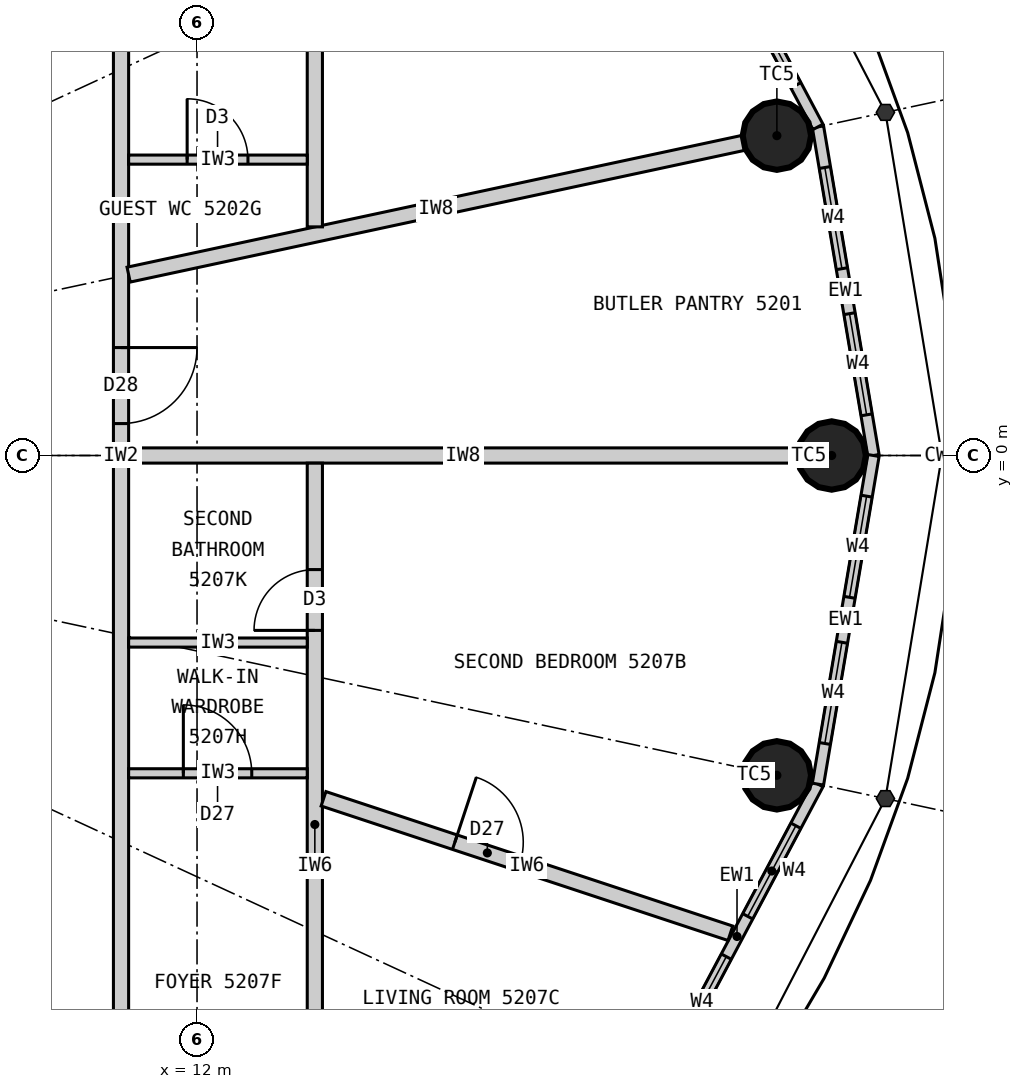
"""IFC4 building model, lengths in metres.
Left out: names, types, materials, properties, quantities, classifications, styles, units other than length and angle.
Written with IfcOpenShell. Run it as: python <this file> out.ifc"""

import sys

from ifc_helpers import new_model, si_unit, direction, frame, frame_2d, origin, origin_2d, place, context, subcontext, project, spatial, rectangle, circle, extrude, element, fill, save


model = new_model("IFC4")
c1 = context("Model", 3, precision=1e-05, world=origin(), true_north=direction((0.0, 1.0)))
c2 = subcontext(c1, "Body", "Model", "MODEL_VIEW")
j1 = project(units=[si_unit("LENGTHUNIT", "METRE"), si_unit("PLANEANGLEUNIT", "RADIAN")], contexts=[c1])
p1 = place(None, origin())
s1 = spatial("IfcSite", under=j1, at=p1, CompositionType="ELEMENT")
p2 = place(p1, origin())
s2 = spatial("IfcBuilding", under=s1, at=p2, CompositionType="ELEMENT")
p3 = place(p2, frame((0.0, 0.0, 196.2)))
s3 = spatial("IfcBuildingStorey", under=s2, at=p3, CompositionType="ELEMENT", Elevation=196.2)
for number, where, z_axis, x_axis in (
    (1, (20.35, 0.0, 0.0), (0.0, 0.0, 1.0), (1.0, 0.0, 0.0)),
    (2, (19.629, 4.208, 0.0), (0.0, 0.0, 1.0), (1.0, 0.0, 0.0)),
    (3, (19.629, -4.208, 0.0), (0.0, 0.0, 1.0), (1.0, 0.0, 0.0)),
):
    element("IfcColumn", number, at=place(p3, frame(where, z_axis=z_axis, x_axis=x_axis)), inside=s3, PredefinedType="COLUMN", context=c2, shape_type="SweptSolid", body=[
        extrude(circle(Radius=0.45, at=origin_2d()), origin(), (0.0, 0.0, 1.0), 3.3),
    ])
p4 = place(p3, frame((20.9, 0.0, 0.0), z_axis=(0.0, 0.0, 1.0), x_axis=(-0.166538513568, 0.986034950445, 0.0)))
e4 = element("IfcWall", 4, at=p4, inside=s3, PredefinedType="ELEMENTEDWALL", context=c2, shape_type="SweptSolid", body=[
    extrude(rectangle(XDim=4.385, YDim=0.15, at=frame_2d((2.192, 0.0))), origin(), (0.0, 0.0, 1.0), 3.12),
])
p5 = place(p4, frame((0.542, 0.0, 0.9)))
e5 = element("IfcOpeningElement", 5, at=p5, cuts=e4, PredefinedType="OPENING", context=c2, shape_type="SweptSolid", body=[
    extrude(rectangle(XDim=1.35, YDim=1.9, at=frame_2d((0.675, 0.95))), frame((0.0, 0.085, 0.0), z_axis=(0.0, -1.0, 0.0), x_axis=(1.0, 0.0, 0.0)), (0.0, 0.0, 1.0), 0.17),
])
p6 = place(p4, frame((2.492, 0.0, 0.9)))
e6 = element("IfcOpeningElement", 6, at=p6, cuts=e4, PredefinedType="OPENING", context=c2, shape_type="SweptSolid", body=[
    extrude(rectangle(XDim=1.35, YDim=1.9, at=frame_2d((0.675, 0.95))), frame((0.0, 0.085, 0.0), z_axis=(0.0, -1.0, 0.0), x_axis=(1.0, 0.0, 0.0)), (0.0, 0.0, 1.0), 0.17),
])
p7 = place(p3, frame((20.17, 4.323, 0.0), z_axis=(0.0, 0.0, 1.0), x_axis=(-0.469256152955, 0.883062094597, 0.0)))
e7 = element("IfcWall", 7, at=p7, inside=s3, PredefinedType="ELEMENTEDWALL", context=c2, shape_type="SweptSolid", body=[
    extrude(rectangle(XDim=4.539, YDim=0.15, at=frame_2d((2.27, 0.0))), origin(), (0.0, 0.0, 1.0), 3.12),
])
p8 = place(p7, frame((0.62, 0.0, 0.9)))
e8 = element("IfcOpeningElement", 8, at=p8, cuts=e7, PredefinedType="OPENING", context=c2, shape_type="SweptSolid", body=[
    extrude(rectangle(XDim=1.35, YDim=1.9, at=frame_2d((0.675, 0.95))), frame((0.0, 0.085, 0.0), z_axis=(0.0, -1.0, 0.0), x_axis=(1.0, 0.0, 0.0)), (0.0, 0.0, 1.0), 0.17),
])
p9 = place(p7, frame((2.57, 0.0, 0.9)))
e9 = element("IfcOpeningElement", 9, at=p9, cuts=e7, PredefinedType="OPENING", context=c2, shape_type="SweptSolid", body=[
    extrude(rectangle(XDim=1.35, YDim=1.9, at=frame_2d((0.675, 0.95))), frame((0.0, 0.085, 0.0), z_axis=(0.0, -1.0, 0.0), x_axis=(1.0, 0.0, 0.0)), (0.0, 0.0, 1.0), 0.17),
])
p10 = place(p3, frame((18.04, -8.332, 0.0), z_axis=(0.0, 0.0, 1.0), x_axis=(0.469256152955, 0.883062094597, 0.0)))
e10 = element("IfcWall", 10, at=p10, inside=s3, PredefinedType="ELEMENTEDWALL", context=c2, shape_type="SweptSolid", body=[
    extrude(rectangle(XDim=4.539, YDim=0.15, at=frame_2d((2.27, 0.0))), origin(), (0.0, 0.0, 1.0), 3.12),
])
p11 = place(p10, frame((0.62, 0.0, 0.9)))
e11 = element("IfcOpeningElement", 11, at=p11, cuts=e10, PredefinedType="OPENING", context=c2, shape_type="SweptSolid", body=[
    extrude(rectangle(XDim=1.35, YDim=1.9, at=frame_2d((0.675, 0.95))), frame((0.0, 0.085, 0.0), z_axis=(0.0, -1.0, 0.0), x_axis=(1.0, 0.0, 0.0)), (0.0, 0.0, 1.0), 0.17),
])
p12 = place(p10, frame((2.57, 0.0, 0.9)))
e12 = element("IfcOpeningElement", 12, at=p12, cuts=e10, PredefinedType="OPENING", context=c2, shape_type="SweptSolid", body=[
    extrude(rectangle(XDim=1.35, YDim=1.9, at=frame_2d((0.675, 0.95))), frame((0.0, 0.085, 0.0), z_axis=(0.0, -1.0, 0.0), x_axis=(1.0, 0.0, 0.0)), (0.0, 0.0, 1.0), 0.17),
])
p13 = place(p3, frame((20.17, -4.323, 0.0), z_axis=(0.0, 0.0, 1.0), x_axis=(0.166538513568, 0.986034950445, 0.0)))
e13 = element("IfcWall", 13, at=p13, inside=s3, PredefinedType="ELEMENTEDWALL", context=c2, shape_type="SweptSolid", body=[
    extrude(rectangle(XDim=4.385, YDim=0.15, at=frame_2d((2.192, 0.0))), origin(), (0.0, 0.0, 1.0), 3.12),
])
p14 = place(p13, frame((0.542, 0.0, 0.9)))
e14 = element("IfcOpeningElement", 14, at=p14, cuts=e13, PredefinedType="OPENING", context=c2, shape_type="SweptSolid", body=[
    extrude(rectangle(XDim=1.35, YDim=1.9, at=frame_2d((0.675, 0.95))), frame((0.0, 0.085, 0.0), z_axis=(0.0, -1.0, 0.0), x_axis=(1.0, 0.0, 0.0)), (0.0, 0.0, 1.0), 0.17),
])
p15 = place(p13, frame((2.492, 0.0, 0.9)))
e15 = element("IfcOpeningElement", 15, at=p15, cuts=e13, PredefinedType="OPENING", context=c2, shape_type="SweptSolid", body=[
    extrude(rectangle(XDim=1.35, YDim=1.9, at=frame_2d((0.675, 0.95))), frame((0.0, 0.085, 0.0), z_axis=(0.0, -1.0, 0.0), x_axis=(1.0, 0.0, 0.0)), (0.0, 0.0, 1.0), 0.17),
])
p16 = place(p3, frame((11.0, -9.9, 0.0), z_axis=(0.0, 0.0, 1.0), x_axis=(0.0, 1.0, 0.0)))
e16 = element("IfcWall", 16, at=p16, inside=s3, PredefinedType="PARTITIONING", context=c2, shape_type="SweptSolid", body=[
    extrude(rectangle(XDim=19.8, YDim=0.2, at=frame_2d((9.9, 0.0))), origin(), (0.0, 0.0, 1.0), 3.12),
])
p17 = place(p16, frame((10.32, 0.0, 0.0)))
e17 = element("IfcOpeningElement", 17, at=p17, cuts=e16, PredefinedType="OPENING", context=c2, shape_type="SweptSolid", body=[
    extrude(rectangle(XDim=1.0, YDim=2.2, at=frame_2d((0.5, 1.1))), frame((0.0, 0.11, 0.0), z_axis=(0.0, -1.0, 0.0), x_axis=(1.0, 0.0, 0.0)), (0.0, 0.0, 1.0), 0.22),
])
p18 = place(p16, frame((18.653, 0.0, 0.0)))
e18 = element("IfcOpeningElement", 18, at=p18, cuts=e16, PredefinedType="OPENING", context=c2, shape_type="SweptSolid", body=[
    extrude(rectangle(XDim=1.0, YDim=2.2, at=frame_2d((0.5, 1.1))), frame((0.0, 0.11, 0.0), z_axis=(0.0, -1.0, 0.0), x_axis=(1.0, 0.0, 0.0)), (0.0, 0.0, 1.0), 0.22),
])
p19 = place(p16, frame((0.379, 0.0, 0.0)))
e19 = element("IfcOpeningElement", 19, at=p19, cuts=e16, PredefinedType="OPENING", context=c2, shape_type="SweptSolid", body=[
    extrude(rectangle(XDim=1.0, YDim=2.2, at=frame_2d((0.5, 1.1))), frame((0.0, 0.11, 0.0), z_axis=(0.0, -1.0, 0.0), x_axis=(1.0, 0.0, 0.0)), (0.0, 0.0, 1.0), 0.22),
])
p20 = place(p3, frame((11.1, 0.0, 0.0), z_axis=(0.0, 0.0, 1.0), x_axis=(1.0, 0.0, 0.0)))
e20 = element("IfcWall", 20, at=p20, inside=s3, PredefinedType="PARTITIONING", context=c2, shape_type="SweptSolid", body=[
    extrude(rectangle(XDim=8.8, YDim=0.2, at=frame_2d((4.4, 0.0))), origin(), (0.0, 0.0, 1.0), 2.37),
])
p21 = place(p3, frame((11.1, 2.379, 0.0), z_axis=(0.0, 0.0, 1.0), x_axis=(0.977789888126, 0.209587534647, 0.0)))
e21 = element("IfcWall", 21, at=p21, inside=s3, PredefinedType="PARTITIONING", context=c2, shape_type="SweptSolid", body=[
    extrude(rectangle(XDim=8.273, YDim=0.2, at=frame_2d((4.136, 0.0))), origin(), (0.0, 0.0, 1.0), 2.42),
])
p22 = place(p3, frame((13.55, 3.008, 0.0), z_axis=(0.0, 0.0, 1.0), x_axis=(0.0, 1.0, 0.0)))
e22 = element("IfcWall", 22, at=p22, inside=s3, PredefinedType="PARTITIONING", context=c2, shape_type="SweptSolid", body=[
    extrude(rectangle(XDim=6.601, YDim=0.2, at=frame_2d((3.3, 0.0))), origin(), (0.0, 0.0, 1.0), 3.12),
])
p23 = place(p22, frame((2.87, 0.0, 0.0)))
e23 = element("IfcOpeningElement", 23, at=p23, cuts=e22, PredefinedType="OPENING", context=c2, shape_type="SweptSolid", body=[
    extrude(rectangle(XDim=0.9, YDim=2.1, at=frame_2d((0.45, 1.05))), frame((0.0, 0.11, 0.0), z_axis=(0.0, -1.0, 0.0), x_axis=(1.0, 0.0, 0.0)), (0.0, 0.0, 1.0), 0.22),
])
p24 = place(p3, frame((11.1, 3.893, 0.0), z_axis=(0.0, 0.0, 1.0), x_axis=(1.0, 0.0, 0.0)))
e24 = element("IfcWall", 24, at=p24, inside=s3, PredefinedType="PARTITIONING", context=c2, shape_type="SweptSolid", body=[
    extrude(rectangle(XDim=2.35, YDim=0.12, at=frame_2d((1.175, 0.0))), origin(), (0.0, 0.0, 1.0), 3.12),
])
p25 = place(p24, frame((0.77, 0.0, 0.0)))
e25 = element("IfcOpeningElement", 25, at=p25, cuts=e24, PredefinedType="OPENING", context=c2, shape_type="SweptSolid", body=[
    extrude(rectangle(XDim=0.8, YDim=2.1, at=frame_2d((0.4, 1.05))), frame((0.0, 0.07, 0.0), z_axis=(0.0, -1.0, 0.0), x_axis=(1.0, 0.0, 0.0)), (0.0, 0.0, 1.0), 0.14),
])
p26 = place(p3, frame((13.55, -9.609, 0.0), z_axis=(0.0, 0.0, 1.0), x_axis=(0.0, 1.0, 0.0)))
e26 = element("IfcWall", 26, at=p26, inside=s3, PredefinedType="PARTITIONING", context=c2, shape_type="SweptSolid", body=[
    extrude(rectangle(XDim=9.508, YDim=0.2, at=frame_2d((4.754, 0.0))), origin(), (0.0, 0.0, 1.0), 3.12),
])
p27 = place(p26, frame((7.308, 0.0, 0.0)))
e27 = element("IfcOpeningElement", 27, at=p27, cuts=e26, PredefinedType="OPENING", context=c2, shape_type="SweptSolid", body=[
    extrude(rectangle(XDim=0.8, YDim=2.1, at=frame_2d((0.4, 1.05))), frame((0.0, 0.11, 0.0), z_axis=(0.0, -1.0, 0.0), x_axis=(1.0, 0.0, 0.0)), (0.0, 0.0, 1.0), 0.22),
])
p28 = place(p3, frame((13.664, -4.516, 0.0), z_axis=(0.0, 0.0, 1.0), x_axis=(0.949481375941, -0.313823384632, 0.0)))
e28 = element("IfcWall", 28, at=p28, inside=s3, PredefinedType="PARTITIONING", context=c2, shape_type="SweptSolid", body=[
    extrude(rectangle(XDim=5.638, YDim=0.2, at=frame_2d((2.819, 0.0))), origin(), (0.0, 0.0, 1.0), 3.12),
])
p29 = place(p28, frame((1.82, 0.0, 0.0)))
e29 = element("IfcOpeningElement", 29, at=p29, cuts=e28, PredefinedType="OPENING", context=c2, shape_type="SweptSolid", body=[
    extrude(rectangle(XDim=0.9, YDim=2.1, at=frame_2d((0.45, 1.05))), frame((0.0, 0.11, 0.0), z_axis=(0.0, -1.0, 0.0), x_axis=(1.0, 0.0, 0.0)), (0.0, 0.0, 1.0), 0.22),
])
p30 = place(p3, frame((11.1, -4.181, 0.0), z_axis=(0.0, 0.0, 1.0), x_axis=(1.0, 0.0, 0.0)))
e30 = element("IfcWall", 30, at=p30, inside=s3, PredefinedType="PARTITIONING", context=c2, shape_type="SweptSolid", body=[
    extrude(rectangle(XDim=2.35, YDim=0.12, at=frame_2d((1.175, 0.0))), origin(), (0.0, 0.0, 1.0), 3.12),
])
p31 = place(p30, frame((0.72, 0.0, 0.0)))
e31 = element("IfcOpeningElement", 31, at=p31, cuts=e30, PredefinedType="OPENING", context=c2, shape_type="SweptSolid", body=[
    extrude(rectangle(XDim=0.9, YDim=2.1, at=frame_2d((0.45, 1.05))), frame((0.0, 0.07, 0.0), z_axis=(0.0, -1.0, 0.0), x_axis=(1.0, 0.0, 0.0)), (0.0, 0.0, 1.0), 0.14),
])
p32 = place(p3, frame((11.1, -2.461, 0.0), z_axis=(0.0, 0.0, 1.0), x_axis=(1.0, 0.0, 0.0)))
e32 = element("IfcWall", 32, at=p32, inside=s3, PredefinedType="PARTITIONING", context=c2, shape_type="SweptSolid", body=[
    extrude(rectangle(XDim=2.35, YDim=0.12, at=frame_2d((1.175, 0.0))), origin(), (0.0, 0.0, 1.0), 3.12),
])
p33 = place(p5, origin())
e33 = element("IfcWindow", 33, at=p33, inside=s3, PartitioningType="SINGLE_PANEL", PredefinedType="WINDOW", context=c2, shape_type="SweptSolid", body=[
    extrude(rectangle(XDim=1.35, YDim=1.9, at=frame_2d((0.675, 0.95))), frame((0.0, 0.03, 0.0), z_axis=(0.0, -1.0, 0.0), x_axis=(1.0, 0.0, 0.0)), (0.0, 0.0, 1.0), 0.06),
])
fill(e5, e33)
p34 = place(p6, origin())
e34 = element("IfcWindow", 34, at=p34, inside=s3, PartitioningType="SINGLE_PANEL", PredefinedType="WINDOW", context=c2, shape_type="SweptSolid", body=[
    extrude(rectangle(XDim=1.35, YDim=1.9, at=frame_2d((0.675, 0.95))), frame((0.0, 0.03, 0.0), z_axis=(0.0, -1.0, 0.0), x_axis=(1.0, 0.0, 0.0)), (0.0, 0.0, 1.0), 0.06),
])
fill(e6, e34)
p35 = place(p8, origin())
e35 = element("IfcWindow", 35, at=p35, inside=s3, PartitioningType="SINGLE_PANEL", PredefinedType="WINDOW", context=c2, shape_type="SweptSolid", body=[
    extrude(rectangle(XDim=1.35, YDim=1.9, at=frame_2d((0.675, 0.95))), frame((0.0, 0.03, 0.0), z_axis=(0.0, -1.0, 0.0), x_axis=(1.0, 0.0, 0.0)), (0.0, 0.0, 1.0), 0.06),
])
fill(e8, e35)
p36 = place(p11, origin())
e36 = element("IfcWindow", 36, at=p36, inside=s3, PartitioningType="SINGLE_PANEL", PredefinedType="WINDOW", context=c2, shape_type="SweptSolid", body=[
    extrude(rectangle(XDim=1.35, YDim=1.9, at=frame_2d((0.675, 0.95))), frame((0.0, 0.03, 0.0), z_axis=(0.0, -1.0, 0.0), x_axis=(1.0, 0.0, 0.0)), (0.0, 0.0, 1.0), 0.06),
])
fill(e11, e36)
p37 = place(p12, origin())
e37 = element("IfcWindow", 37, at=p37, inside=s3, PartitioningType="SINGLE_PANEL", PredefinedType="WINDOW", context=c2, shape_type="SweptSolid", body=[
    extrude(rectangle(XDim=1.35, YDim=1.9, at=frame_2d((0.675, 0.95))), frame((0.0, 0.03, 0.0), z_axis=(0.0, -1.0, 0.0), x_axis=(1.0, 0.0, 0.0)), (0.0, 0.0, 1.0), 0.06),
])
fill(e12, e37)
p38 = place(p14, origin())
e38 = element("IfcWindow", 38, at=p38, inside=s3, PartitioningType="SINGLE_PANEL", PredefinedType="WINDOW", context=c2, shape_type="SweptSolid", body=[
    extrude(rectangle(XDim=1.35, YDim=1.9, at=frame_2d((0.675, 0.95))), frame((0.0, 0.03, 0.0), z_axis=(0.0, -1.0, 0.0), x_axis=(1.0, 0.0, 0.0)), (0.0, 0.0, 1.0), 0.06),
])
fill(e14, e38)
p39 = place(p15, origin())
e39 = element("IfcWindow", 39, at=p39, inside=s3, PartitioningType="SINGLE_PANEL", PredefinedType="WINDOW", context=c2, shape_type="SweptSolid", body=[
    extrude(rectangle(XDim=1.35, YDim=1.9, at=frame_2d((0.675, 0.95))), frame((0.0, 0.03, 0.0), z_axis=(0.0, -1.0, 0.0), x_axis=(1.0, 0.0, 0.0)), (0.0, 0.0, 1.0), 0.06),
])
fill(e15, e39)
p40 = place(p17, origin())
e40 = element("IfcDoor", 40, at=p40, inside=s3, OperationType="SINGLE_SWING_RIGHT", PredefinedType="DOOR", context=c2, shape_type="SweptSolid", body=[
    extrude(rectangle(XDim=1.0, YDim=2.2, at=frame_2d((0.5, 1.1))), frame((0.0, 0.025, 0.0), z_axis=(0.0, -1.0, 0.0), x_axis=(1.0, 0.0, 0.0)), (0.0, 0.0, 1.0), 0.05),
])
fill(e17, e40)
p41 = place(p25, origin())
e41 = element("IfcDoor", 41, at=p41, inside=s3, OperationType="SINGLE_SWING_LEFT", PredefinedType="DOOR", context=c2, shape_type="SweptSolid", body=[
    extrude(rectangle(XDim=0.8, YDim=2.1, at=frame_2d((0.4, 1.05))), frame((0.0, 0.025, 0.0), z_axis=(0.0, -1.0, 0.0), x_axis=(1.0, 0.0, 0.0)), (0.0, 0.0, 1.0), 0.05),
])
fill(e25, e41)
p42 = place(p31, origin())
e42 = element("IfcDoor", 42, at=p42, inside=s3, OperationType="SINGLE_SWING_LEFT", PredefinedType="DOOR", context=c2, shape_type="SweptSolid", body=[
    extrude(rectangle(XDim=0.9, YDim=2.1, at=frame_2d((0.45, 1.05))), frame((0.0, 0.025, 0.0), z_axis=(0.0, -1.0, 0.0), x_axis=(1.0, 0.0, 0.0)), (0.0, 0.0, 1.0), 0.05),
])
fill(e31, e42)
p43 = place(p27, origin())
e43 = element("IfcDoor", 43, at=p43, inside=s3, OperationType="SINGLE_SWING_LEFT", PredefinedType="DOOR", context=c2, shape_type="SweptSolid", body=[
    extrude(rectangle(XDim=0.8, YDim=2.1, at=frame_2d((0.4, 1.05))), frame((0.0, 0.025, 0.0), z_axis=(0.0, -1.0, 0.0), x_axis=(1.0, 0.0, 0.0)), (0.0, 0.0, 1.0), 0.05),
])
fill(e27, e43)
p44 = place(p29, origin())
e44 = element("IfcDoor", 44, at=p44, inside=s3, OperationType="SINGLE_SWING_LEFT", PredefinedType="DOOR", context=c2, shape_type="SweptSolid", body=[
    extrude(rectangle(XDim=0.9, YDim=2.1, at=frame_2d((0.45, 1.05))), frame((0.0, 0.025, 0.0), z_axis=(0.0, -1.0, 0.0), x_axis=(1.0, 0.0, 0.0)), (0.0, 0.0, 1.0), 0.05),
])
fill(e29, e44)
save(model, sys.argv[1])
